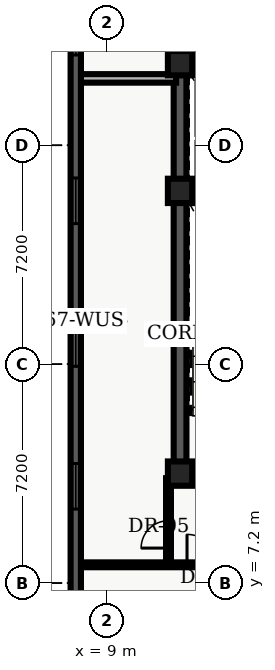
"""IFC4 building model, lengths in metres.
Left out: names, types, materials, properties, quantities, classifications, styles, units other than length and angle.
Written with IfcOpenShell. Run it as: python <this file> out.ifc"""

import sys

from ifc_helpers import new_model, entity, si_unit, converted_unit, direction, frame, origin_with_axes, origin_2d_with_axis, place, context, subcontext, project, spatial, polyline, rectangle, outline, extrude, element, fill, save


model = new_model("IFC4")
c1 = context("Model", 3, precision=1e-05, world=origin_with_axes(), true_north=direction((0.0, 1.0)))
c2 = subcontext(c1, "Body", "Model", "MODEL_VIEW")
j1 = project(units=[si_unit("LENGTHUNIT", "METRE"), converted_unit("PLANEANGLEUNIT", "DEGREE", entity("IfcPlaneAngleMeasure", 0.017), si_unit("PLANEANGLEUNIT", "RADIAN"), dimensions=[0, 0, 0, 0, 0, 0, 0])], contexts=[c1])
p1 = place(None, origin_with_axes())
s1 = spatial("IfcSite", under=j1, at=p1, CompositionType="ELEMENT")
p2 = place(p1, origin_with_axes())
s2 = spatial("IfcBuilding", under=s1, at=p2, CompositionType="ELEMENT")
p3 = place(p2, frame((0.0, 0.0, 272.4), z_axis=(0.0, 0.0, 1.0), x_axis=(1.0, 0.0, 0.0)))
s3 = spatial("IfcBuildingStorey", under=s2, at=p3, CompositionType="ELEMENT", Elevation=272.4)
p4 = place(p3, frame((11.4, 10.8, 0.0), z_axis=(0.0, 0.0, 1.0), x_axis=(0.0, 1.0, 0.0)))
e1 = element("IfcWall", 1, at=p4, inside=s3, PredefinedType="SHEAR", context=c2, shape_type="SweptSolid", body=[
    extrude(outline(polyline([(0.0, -0.21), (27.0, -0.21), (27.0, 0.21), (0.0, 0.21), (0.0, -0.21)])), origin_with_axes(), (0.0, 0.0, 1.0), 3.66),
])
p5 = place(p3, frame((11.4, 10.8, 0.0), z_axis=(0.0, 0.0, 1.0), x_axis=(1.0, 0.0, 0.0)))
e2 = element("IfcWall", 2, at=p5, inside=s3, PredefinedType="SHEAR", context=c2, shape_type="SweptSolid", body=[
    extrude(outline(polyline([(0.0, -0.21), (7.2, -0.21), (7.2, 0.21), (0.0, 0.21), (0.0, -0.21)])), origin_with_axes(), (0.0, 0.0, 1.0), 3.66),
])
p6 = place(p5, frame((2.625, 0.0, 0.0), z_axis=(0.0, 0.0, 1.0), x_axis=(1.0, 0.0, 0.0)))
e3 = element("IfcOpeningElement", 3, at=p6, cuts=e2, PredefinedType="OPENING", context=c2, shape_type="SweptSolid", body=[
    extrude(rectangle(XDim=1.05, YDim=0.44, at=origin_2d_with_axis()), origin_with_axes(), (0.0, 0.0, 1.0), 2.15),
])
p7 = place(p3, frame((11.61, 19.825, 0.0), z_axis=(0.0, 0.0, 1.0), x_axis=(1.0, 0.0, 0.0)))
e4 = element("IfcWall", 4, at=p7, inside=s3, PredefinedType="SHEAR", context=c2, shape_type="SweptSolid", body=[
    extrude(outline(polyline([(0.0, -0.125), (6.78, -0.125), (6.78, 0.125), (0.0, 0.125), (0.0, -0.125)])), origin_with_axes(), (0.0, 0.0, 1.0), 3.66),
])
p8 = place(p3, frame((11.7, 24.1, 0.0), z_axis=(0.0, 0.0, 1.0), x_axis=(1.0, 0.0, 0.0)))
e5 = element("IfcWall", 5, at=p8, inside=s3, PredefinedType="SOLIDWALL", context=c2, shape_type="SweptSolid", body=[
    extrude(outline(polyline([(0.0, -0.125), (6.6, -0.125), (6.6, 0.125), (0.0, 0.125), (0.0, -0.125)])), origin_with_axes(), (0.0, 0.0, 1.0), 2.7),
])
p9 = place(p8, frame((3.6, 0.0, 0.0), z_axis=(0.0, 0.0, 1.0), x_axis=(1.0, 0.0, 0.0)))
e6 = element("IfcOpeningElement", 6, at=p9, cuts=e5, PredefinedType="OPENING", context=c2, shape_type="SweptSolid", body=[
    extrude(rectangle(XDim=0.9, YDim=0.27, at=origin_2d_with_axis()), origin_with_axes(), (0.0, 0.0, 1.0), 2.15),
])
p10 = place(p8, frame((5.65, 0.0, 0.0), z_axis=(0.0, 0.0, 1.0), x_axis=(1.0, 0.0, 0.0)))
e7 = element("IfcOpeningElement", 7, at=p10, cuts=e5, PredefinedType="OPENING", context=c2, shape_type="SweptSolid", body=[
    extrude(rectangle(XDim=0.9, YDim=0.27, at=origin_2d_with_axis()), origin_with_axes(), (0.0, 0.0, 1.0), 2.15),
])
for number, where, z_axis, x_axis in (
    (8, (11.4, 10.8, 0.0), (0.0, 0.0, 1.0), (1.0, 0.0, 0.0)),
    (9, (11.4, 20.1, 0.0), (0.0, 0.0, 1.0), (1.0, 0.0, 0.0)),
    (10, (11.4, 24.3, 0.0), (0.0, 0.0, 1.0), (1.0, 0.0, 0.0)),
):
    element("IfcColumn", number, at=place(p3, frame(where, z_axis=z_axis, x_axis=x_axis)), inside=s3, PredefinedType="COLUMN", context=c2, shape_type="SweptSolid", body=[
        extrude(rectangle(XDim=0.8, YDim=0.8, at=origin_2d_with_axis()), origin_with_axes(), (0.0, 0.0, 1.0), 3.9),
    ])
p11 = place(p3, frame((8.135, 7.8, 0.0), z_axis=(0.0, 0.0, 1.0), x_axis=(1.0, 0.0, 0.0)))
e11 = element("IfcWall", 11, at=p11, inside=s3, PredefinedType="PARTITIONING", context=c2, shape_type="SweptSolid", body=[
    extrude(outline(polyline([(0.0, -0.08), (12.165, -0.08), (12.165, 0.08), (0.0, 0.08), (0.0, -0.08)])), origin_with_axes(), (0.0, 0.0, 1.0), 2.7),
])
p12 = place(p11, frame((3.994, 0.0, 0.0), z_axis=(0.0, 0.0, 1.0), x_axis=(1.0, 0.0, 0.0)))
e12 = element("IfcOpeningElement", 12, at=p12, cuts=e11, PredefinedType="OPENING", context=c2, shape_type="SweptSolid", body=[
    extrude(rectangle(XDim=1.0, YDim=0.18, at=origin_2d_with_axis()), origin_with_axes(), (0.0, 0.0, 1.0), 2.15),
])
p13 = place(p11, frame((8.794, 0.0, 0.0), z_axis=(0.0, 0.0, 1.0), x_axis=(1.0, 0.0, 0.0)))
e13 = element("IfcOpeningElement", 13, at=p13, cuts=e11, PredefinedType="OPENING", context=c2, shape_type="SweptSolid", body=[
    extrude(rectangle(XDim=1.0, YDim=0.18, at=origin_2d_with_axis()), origin_with_axes(), (0.0, 0.0, 1.0), 2.15),
])
p14 = place(p3, frame((11.02, 7.8, 0.0), z_axis=(0.0, 0.0, 1.0), x_axis=(0.0, 1.0, 0.0)))
e14 = element("IfcWall", 14, at=p14, inside=s3, PredefinedType="PARTITIONING", context=c2, shape_type="SweptSolid", body=[
    extrude(outline(polyline([(0.0, -0.08), (2.85, -0.08), (2.85, 0.08), (0.0, 0.08), (0.0, -0.08)])), origin_with_axes(), (0.0, 0.0, 1.0), 2.7),
])
p15 = place(p14, frame((1.0, 0.0, 0.0), z_axis=(0.0, 0.0, 1.0), x_axis=(1.0, 0.0, 0.0)))
e15 = element("IfcOpeningElement", 15, at=p15, cuts=e14, PredefinedType="OPENING", context=c2, shape_type="SweptSolid", body=[
    extrude(rectangle(XDim=0.9, YDim=0.18, at=origin_2d_with_axis()), origin_with_axes(), (0.0, 0.0, 1.0), 2.15),
])
p16 = place(p3, frame((8.135, 23.8, 0.0), z_axis=(0.0, 0.0, 1.0), x_axis=(1.0, 0.0, 0.0)))
e16 = element("IfcWall", 16, at=p16, inside=s3, PredefinedType="PARTITIONING", context=c2, shape_type="SweptSolid", body=[
    extrude(outline(polyline([(0.0, -0.14), (3.135, -0.14), (3.135, 0.14), (0.0, 0.14), (0.0, -0.14)])), origin_with_axes(), (0.0, 0.0, 1.0), 2.7),
])
p17 = place(p3, frame((7.97, 2.74, 0.0), z_axis=(0.0, 0.0, 1.0), x_axis=(0.0, 1.0, 0.0)))
e17 = element("IfcWall", 17, at=p17, inside=s3, PredefinedType="SOLIDWALL", context=c2, shape_type="SweptSolid", body=[
    extrude(outline(polyline([(0.0, -0.17), (43.46, -0.17), (43.46, 0.17), (0.0, 0.17), (0.0, -0.17)])), origin_with_axes(), (0.0, 0.0, 1.0), 3.66),
])
p18 = place(p17, frame((2.948, 0.0, 0.45), z_axis=(0.0, 0.0, 1.0), x_axis=(1.0, 0.0, 0.0)))
e18 = element("IfcOpeningElement", 18, at=p18, cuts=e17, PredefinedType="OPENING", context=c2, shape_type="SweptSolid", body=[
    extrude(rectangle(XDim=1.5, YDim=0.36, at=origin_2d_with_axis()), origin_with_axes(), (0.0, 0.0, 1.0), 2.1),
])
p19 = place(p17, frame((7.643, 0.0, 0.45), z_axis=(0.0, 0.0, 1.0), x_axis=(1.0, 0.0, 0.0)))
e19 = element("IfcOpeningElement", 19, at=p19, cuts=e17, PredefinedType="OPENING", context=c2, shape_type="SweptSolid", body=[
    extrude(rectangle(XDim=1.5, YDim=0.36, at=origin_2d_with_axis()), origin_with_axes(), (0.0, 0.0, 1.0), 2.1),
])
p20 = place(p17, frame((12.339, 0.0, 0.45), z_axis=(0.0, 0.0, 1.0), x_axis=(1.0, 0.0, 0.0)))
e20 = element("IfcOpeningElement", 20, at=p20, cuts=e17, PredefinedType="OPENING", context=c2, shape_type="SweptSolid", body=[
    extrude(rectangle(XDim=1.5, YDim=0.36, at=origin_2d_with_axis()), origin_with_axes(), (0.0, 0.0, 1.0), 2.1),
])
p21 = place(p17, frame((17.034, 0.0, 0.45), z_axis=(0.0, 0.0, 1.0), x_axis=(1.0, 0.0, 0.0)))
e21 = element("IfcOpeningElement", 21, at=p21, cuts=e17, PredefinedType="OPENING", context=c2, shape_type="SweptSolid", body=[
    extrude(rectangle(XDim=1.5, YDim=0.36, at=origin_2d_with_axis()), origin_with_axes(), (0.0, 0.0, 1.0), 2.1),
])
p22 = place(p17, frame((22.58, 0.0, 0.45), z_axis=(0.0, 0.0, 1.0), x_axis=(1.0, 0.0, 0.0)))
e22 = element("IfcOpeningElement", 22, at=p22, cuts=e17, PredefinedType="OPENING", context=c2, shape_type="SweptSolid", body=[
    extrude(rectangle(XDim=1.5, YDim=0.36, at=origin_2d_with_axis()), origin_with_axes(), (0.0, 0.0, 1.0), 2.1),
])
p23 = place(p17, frame((26.426, 0.0, 0.45), z_axis=(0.0, 0.0, 1.0), x_axis=(1.0, 0.0, 0.0)))
e23 = element("IfcOpeningElement", 23, at=p23, cuts=e17, PredefinedType="OPENING", context=c2, shape_type="SweptSolid", body=[
    extrude(rectangle(XDim=1.5, YDim=0.36, at=origin_2d_with_axis()), origin_with_axes(), (0.0, 0.0, 1.0), 2.1),
])
p24 = place(p17, frame((31.121, 0.0, 0.45), z_axis=(0.0, 0.0, 1.0), x_axis=(1.0, 0.0, 0.0)))
e24 = element("IfcOpeningElement", 24, at=p24, cuts=e17, PredefinedType="OPENING", context=c2, shape_type="SweptSolid", body=[
    extrude(rectangle(XDim=1.5, YDim=0.36, at=origin_2d_with_axis()), origin_with_axes(), (0.0, 0.0, 1.0), 2.1),
])
p25 = place(p17, frame((35.817, 0.0, 0.45), z_axis=(0.0, 0.0, 1.0), x_axis=(1.0, 0.0, 0.0)))
e25 = element("IfcOpeningElement", 25, at=p25, cuts=e17, PredefinedType="OPENING", context=c2, shape_type="SweptSolid", body=[
    extrude(rectangle(XDim=1.5, YDim=0.36, at=origin_2d_with_axis()), origin_with_axes(), (0.0, 0.0, 1.0), 2.1),
])
p26 = place(p17, frame((40.512, 0.0, 0.45), z_axis=(0.0, 0.0, 1.0), x_axis=(1.0, 0.0, 0.0)))
e26 = element("IfcOpeningElement", 26, at=p26, cuts=e17, PredefinedType="OPENING", context=c2, shape_type="SweptSolid", body=[
    extrude(rectangle(XDim=1.5, YDim=0.36, at=origin_2d_with_axis()), origin_with_axes(), (0.0, 0.0, 1.0), 2.1),
])
p27 = place(p14, frame((1.0, 0.0, 0.0), z_axis=(0.0, 0.0, 1.0), x_axis=(1.0, 0.0, 0.0)))
e27 = element("IfcDoor", 27, at=p27, inside=s3, OperationType="SINGLE_SWING_LEFT", PredefinedType="DOOR", context=c2, shape_type="SweptSolid", body=[
    extrude(rectangle(XDim=0.9, YDim=0.09, at=origin_2d_with_axis()), origin_with_axes(), (0.0, 0.0, 1.0), 2.15),
])
fill(e15, e27)
p28 = place(p11, frame((3.994, 0.0, 0.0), z_axis=(0.0, 0.0, 1.0), x_axis=(1.0, 0.0, 0.0)))
e28 = element("IfcDoor", 28, at=p28, inside=s3, OperationType="SINGLE_SWING_LEFT", PredefinedType="DOOR", context=c2, shape_type="SweptSolid", body=[
    extrude(rectangle(XDim=1.0, YDim=0.09, at=origin_2d_with_axis()), origin_with_axes(), (0.0, 0.0, 1.0), 2.15),
])
fill(e12, e28)
p29 = place(p17, frame((7.643, 0.0, 0.45), z_axis=(0.0, 0.0, 1.0), x_axis=(1.0, 0.0, 0.0)))
e29 = element("IfcWindow", 29, at=p29, inside=s3, PredefinedType="WINDOW", context=c2, shape_type="SweptSolid", body=[
    extrude(rectangle(XDim=1.5, YDim=0.09, at=origin_2d_with_axis()), origin_with_axes(), (0.0, 0.0, 1.0), 2.1),
])
fill(e19, e29)
p30 = place(p17, frame((12.339, 0.0, 0.45), z_axis=(0.0, 0.0, 1.0), x_axis=(1.0, 0.0, 0.0)))
e30 = element("IfcWindow", 30, at=p30, inside=s3, PredefinedType="WINDOW", context=c2, shape_type="SweptSolid", body=[
    extrude(rectangle(XDim=1.5, YDim=0.09, at=origin_2d_with_axis()), origin_with_axes(), (0.0, 0.0, 1.0), 2.1),
])
fill(e20, e30)
p31 = place(p17, frame((17.034, 0.0, 0.45), z_axis=(0.0, 0.0, 1.0), x_axis=(1.0, 0.0, 0.0)))
e31 = element("IfcWindow", 31, at=p31, inside=s3, PredefinedType="WINDOW", context=c2, shape_type="SweptSolid", body=[
    extrude(rectangle(XDim=1.5, YDim=0.09, at=origin_2d_with_axis()), origin_with_axes(), (0.0, 0.0, 1.0), 2.1),
])
fill(e21, e31)
p32 = place(p17, frame((22.58, 0.0, 0.45), z_axis=(0.0, 0.0, 1.0), x_axis=(1.0, 0.0, 0.0)))
e32 = element("IfcWindow", 32, at=p32, inside=s3, PredefinedType="WINDOW", context=c2, shape_type="SweptSolid", body=[
    extrude(rectangle(XDim=1.5, YDim=0.09, at=origin_2d_with_axis()), origin_with_axes(), (0.0, 0.0, 1.0), 2.1),
])
fill(e22, e32)
save(model, sys.argv[1])
